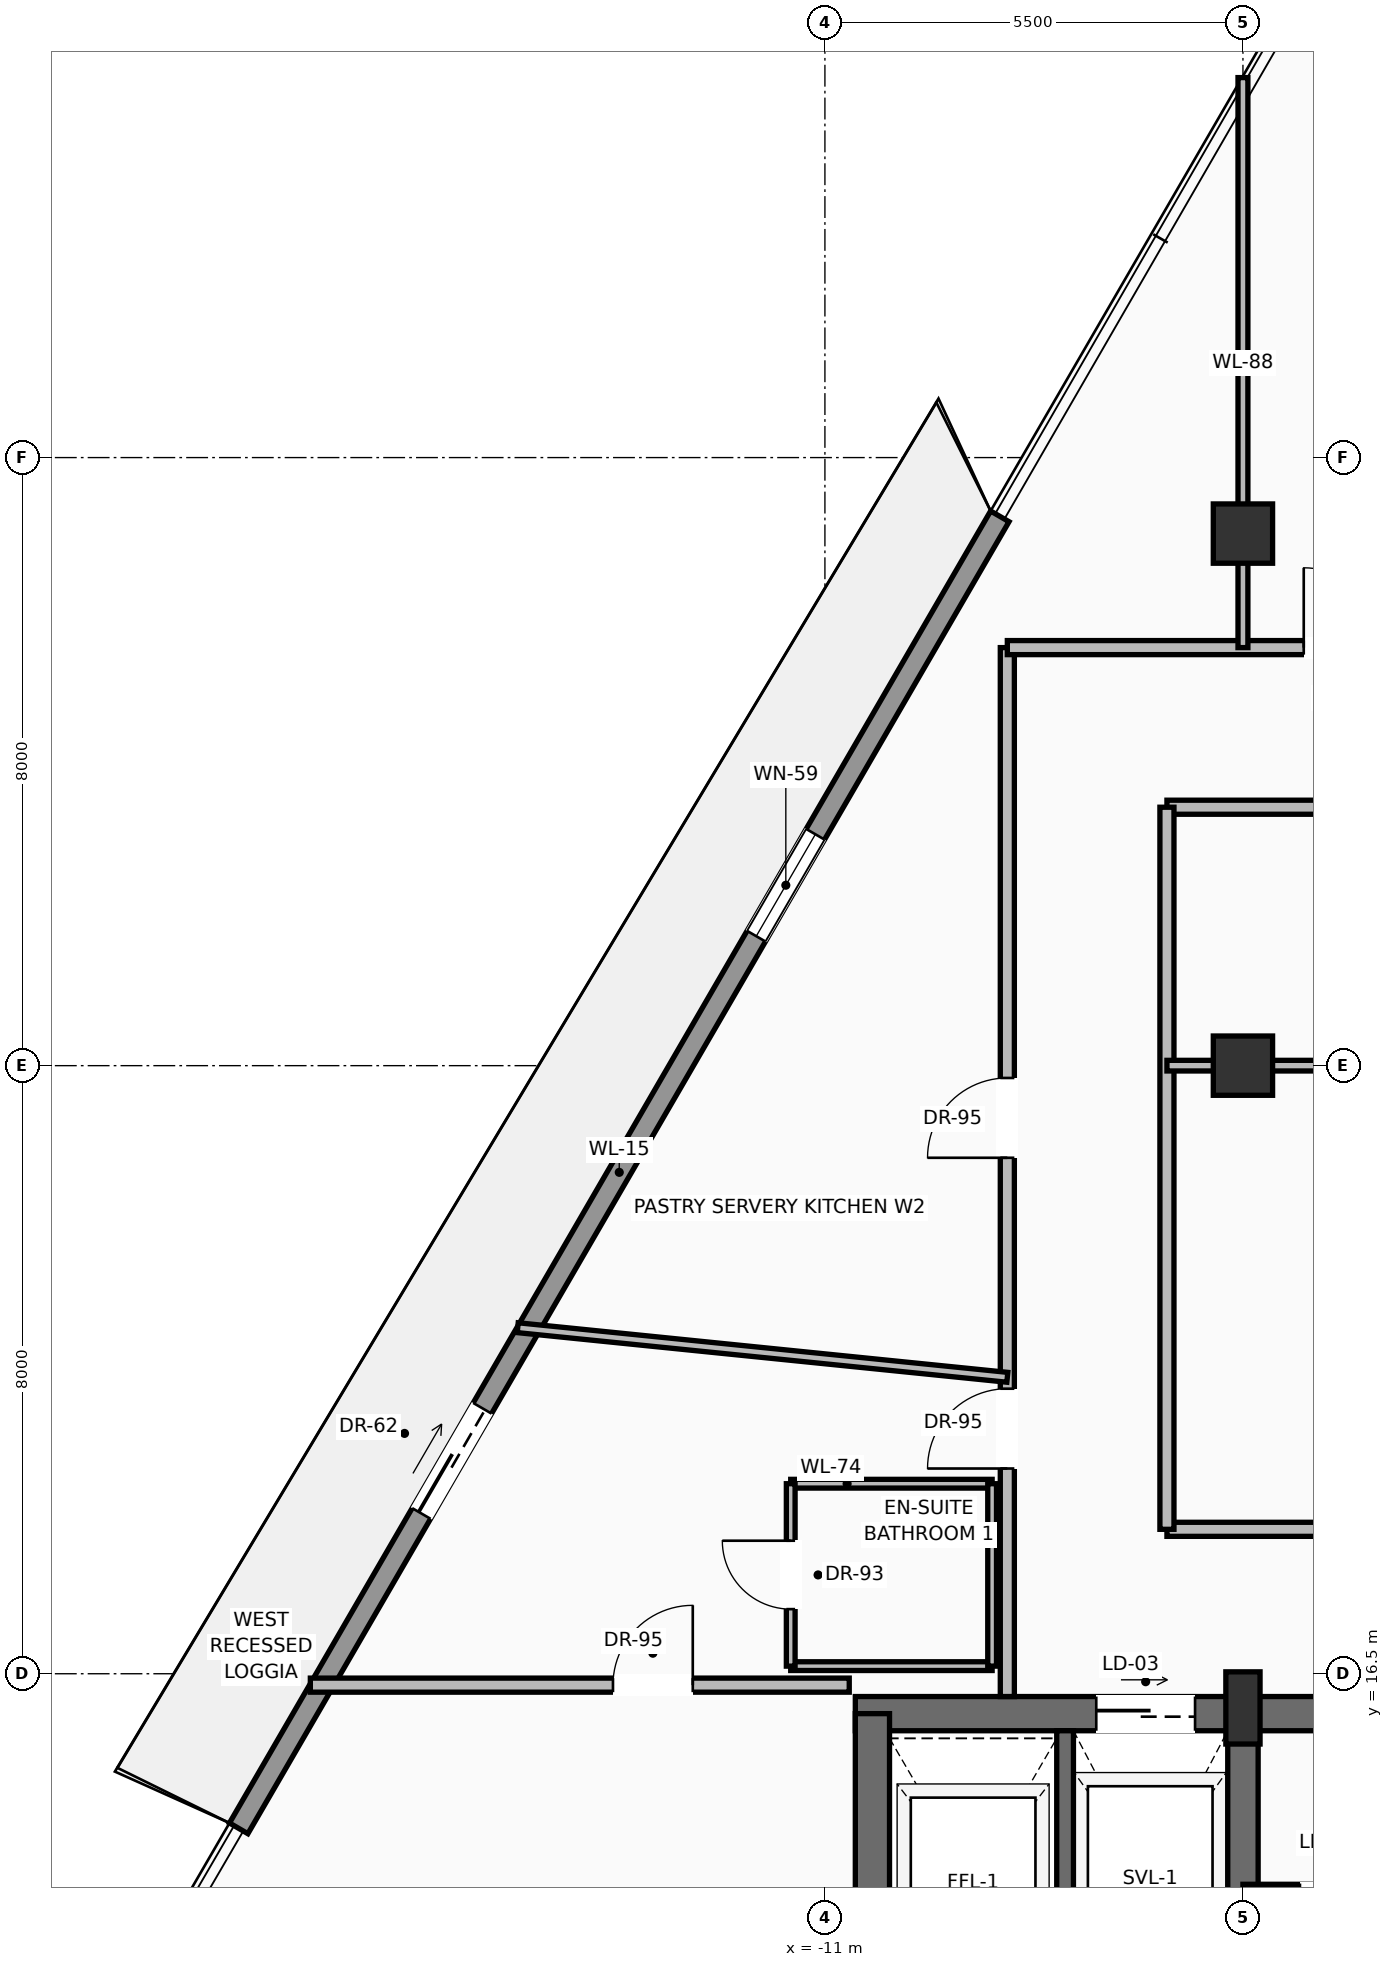
"""IFC4 building model, lengths in metres.
Left out: names, types, materials, properties, quantities, classifications, styles, units other than length and angle.
Written with IfcOpenShell. Run it as: python <this file> out.ifc"""

import sys

from ifc_helpers import new_model, si_unit, direction, frame, frame_2d, origin, origin_2d, place, context, subcontext, project, spatial, rectangle, extrude, source, transform, mapped, element, fill, save


model = new_model("IFC4")
c1 = context("Model", 3, precision=1e-05, world=origin(), true_north=direction((0.0, 1.0)))
c2 = subcontext(c1, "Body", "Model", "MODEL_VIEW")
j1 = project(units=[si_unit("LENGTHUNIT", "METRE"), si_unit("PLANEANGLEUNIT", "RADIAN")], contexts=[c1])
p1 = place(None, origin())
s1 = spatial("IfcSite", under=j1, at=p1, CompositionType="ELEMENT")
p2 = place(p1, origin())
s2 = spatial("IfcBuilding", under=s1, at=p2, CompositionType="ELEMENT")
p3 = place(p2, frame((0.0, 0.0, 266.1)))
s3 = spatial("IfcBuildingStorey", under=s2, at=p3, CompositionType="ELEMENT", Elevation=266.1)
p4 = place(p3, frame((-10.6, 15.975, 0.0), z_axis=(0.0, 0.0, 1.0), x_axis=(1.0, 0.0, 0.0)))
e1 = element("IfcWall", 1, at=p4, inside=s3, PredefinedType="SHEAR", context=c2, shape_type="SweptSolid", body=[
    extrude(rectangle(XDim=21.2, YDim=0.45, at=frame_2d((10.6, 0.0))), origin(), (0.0, 0.0, 1.0), 3.24),
])
p5 = place(p4, frame((3.17, 0.0, 0.0)))
e2 = element("IfcOpeningElement", 2, at=p5, cuts=e1, PredefinedType="OPENING", context=c2, shape_type="SweptSolid", body=[
    extrude(rectangle(XDim=1.3, YDim=2.3, at=frame_2d((0.65, 1.15))), frame((0.0, 0.235, 0.0), z_axis=(0.0, -1.0, 0.0), x_axis=(1.0, 0.0, 0.0)), (0.0, 0.0, 1.0), 0.47),
])
p6 = place(p4, frame((9.6, 0.0, 0.0)))
e3 = element("IfcOpeningElement", 3, at=p6, cuts=e1, PredefinedType="OPENING", context=c2, shape_type="SweptSolid", body=[
    extrude(rectangle(XDim=2.0, YDim=2.4, at=frame_2d((1.0, 1.2))), frame((0.0, 0.235, 0.0), z_axis=(0.0, -1.0, 0.0), x_axis=(1.0, 0.0, 0.0)), (0.0, 0.0, 1.0), 0.47),
])
p7 = place(p3, frame((-10.375, 0.625, 0.0), z_axis=(0.0, 0.0, 1.0), x_axis=(0.0, 1.0, 0.0)))
e4 = element("IfcWall", 4, at=p7, inside=s3, PredefinedType="SHEAR", context=c2, shape_type="SweptSolid", body=[
    extrude(rectangle(XDim=15.35, YDim=0.45, at=frame_2d((7.675, 0.0))), origin(), (0.0, 0.0, 1.0), 3.24),
])
p8 = place(p3, frame((-5.5, 0.625, 0.0), z_axis=(0.0, 0.0, 1.0), x_axis=(0.0, 1.0, 0.0)))
e5 = element("IfcWall", 5, at=p8, inside=s3, PredefinedType="SHEAR", context=c2, shape_type="SweptSolid", body=[
    extrude(rectangle(XDim=15.35, YDim=0.4, at=frame_2d((7.675, 0.0))), origin(), (0.0, 0.0, 1.0), 3.24),
])
p9 = place(p8, frame((8.875, 0.0, 0.0)))
e6 = element("IfcOpeningElement", 6, at=p9, cuts=e5, PredefinedType="OPENING", context=c2, shape_type="SweptSolid", body=[
    extrude(rectangle(XDim=1.1, YDim=2.2, at=frame_2d((0.55, 1.1))), frame((0.0, 0.21, 0.0), z_axis=(0.0, -1.0, 0.0), x_axis=(1.0, 0.0, 0.0)), (0.0, 0.0, 1.0), 0.42),
])
m1 = source(origin(), c2, "Body", "SweptSolid", [
    extrude(rectangle(XDim=0.45, YDim=0.95, at=origin_2d()), origin(), (0.0, 0.0, 1.0), 3.45),
])
p10 = place(p3, frame((-5.5, 16.05, 0.0), z_axis=(0.0, 0.0, 1.0), x_axis=(1.0, 0.0, 0.0)))
e7 = element("IfcColumn", 7, at=p10, inside=s3, PredefinedType="PILASTER", context=c2, shape_type="MappedRepresentation", body=[
    mapped(m1, transform((0.0, 0.0, 0.0), scale=1.0)),
])
m2 = source(origin(), c2, "Body", "SweptSolid", [
    extrude(rectangle(XDim=0.78, YDim=0.78, at=origin_2d()), origin(), (0.0, 0.0, 1.0), 3.45),
])
for number, where, z_axis, x_axis in (
    (8, (-5.5, 24.5, 0.0), (0.0, 0.0, 1.0), (1.0, 0.0, 0.0)),
    (9, (-5.5, 31.5, 0.0), (0.0, 0.0, 1.0), (1.0, 0.0, 0.0)),
):
    element("IfcColumn", number, at=place(p3, frame(where, z_axis=z_axis, x_axis=x_axis)), inside=s3, PredefinedType="COLUMN", context=c2, shape_type="MappedRepresentation", body=[
        mapped(m2, transform((0.0, 0.0, 0.0), scale=1.0)),
    ])
p11 = place(p3, frame((-18.713, 14.466, 0.0), z_axis=(0.0, 0.0, 1.0), x_axis=(0.501837095331, 0.864962155097, 0.0)))
e10 = element("IfcWall", 10, at=p11, inside=s3, PredefinedType="SOLIDWALL", context=c2, shape_type="SweptSolid", body=[
    extrude(rectangle(XDim=19.956, YDim=0.28, at=frame_2d((9.978, 0.0))), origin(), (0.0, 0.0, 1.0), 2.82),
])
p12 = place(p11, frame((4.789, 0.0, 0.0)))
e11 = element("IfcOpeningElement", 11, at=p12, cuts=e10, PredefinedType="OPENING", context=c2, shape_type="SweptSolid", body=[
    extrude(rectangle(XDim=1.6, YDim=2.35, at=frame_2d((0.8, 1.175))), frame((0.0, 0.15, 0.0), z_axis=(0.0, -1.0, 0.0), x_axis=(1.0, 0.0, 0.0)), (0.0, 0.0, 1.0), 0.3),
])
p13 = place(p11, frame((13.57, 0.0, 0.9)))
e12 = element("IfcOpeningElement", 12, at=p13, cuts=e10, PredefinedType="OPENING", context=c2, shape_type="SweptSolid", body=[
    extrude(rectangle(XDim=1.55, YDim=1.75, at=frame_2d((0.775, 0.875))), frame((0.0, 0.15, 0.0), z_axis=(0.0, -1.0, 0.0), x_axis=(1.0, 0.0, 0.0)), (0.0, 0.0, 1.0), 0.3),
])
p14 = place(p3, frame((-7.84, 11.87, 0.0), z_axis=(0.0, 0.0, 1.0), x_axis=(0.0, 1.0, 0.0)))
e13 = element("IfcWall", 13, at=p14, inside=s3, PredefinedType="SOLIDWALL", context=c2, shape_type="SweptSolid", body=[
    extrude(rectangle(XDim=3.88, YDim=0.22, at=frame_2d((1.94, 0.0))), origin(), (0.0, 0.0, 1.0), 3.24),
])
p15 = place(p3, frame((-5.5, 13.62, 0.0), z_axis=(0.0, 0.0, 1.0), x_axis=(1.0, 0.0, 0.0)))
e14 = element("IfcWall", 14, at=p15, inside=s3, PredefinedType="SOLIDWALL", context=c2, shape_type="SweptSolid", body=[
    extrude(rectangle(XDim=7.32, YDim=0.22, at=frame_2d((3.66, 0.0))), origin(), (0.0, 0.0, 1.0), 3.24),
])
p16 = place(p15, frame((0.75, 0.0, 0.0)))
e15 = element("IfcOpeningElement", 15, at=p16, cuts=e14, PredefinedType="OPENING", context=c2, shape_type="SweptSolid", body=[
    extrude(rectangle(XDim=1.1, YDim=2.2, at=frame_2d((0.55, 1.1))), frame((0.0, 0.12, 0.0), z_axis=(0.0, -1.0, 0.0), x_axis=(1.0, 0.0, 0.0)), (0.0, 0.0, 1.0), 0.24),
])
p17 = place(p15, frame((3.15, 0.0, 0.0)))
e16 = element("IfcOpeningElement", 16, at=p17, cuts=e14, PredefinedType="OPENING", context=c2, shape_type="SweptSolid", body=[
    extrude(rectangle(XDim=1.1, YDim=2.2, at=frame_2d((0.55, 1.1))), frame((0.0, 0.12, 0.0), z_axis=(0.0, -1.0, 0.0), x_axis=(1.0, 0.0, 0.0)), (0.0, 0.0, 1.0), 0.24),
])
p18 = place(p15, frame((5.55, 0.0, 0.0)))
e17 = element("IfcOpeningElement", 17, at=p18, cuts=e14, PredefinedType="OPENING", context=c2, shape_type="SweptSolid", body=[
    extrude(rectangle(XDim=1.1, YDim=2.2, at=frame_2d((0.55, 1.1))), frame((0.0, 0.12, 0.0), z_axis=(0.0, -1.0, 0.0), x_axis=(1.0, 0.0, 0.0)), (0.0, 0.0, 1.0), 0.24),
])
p19 = place(p3, frame((-6.5, 18.4, 0.0), z_axis=(0.0, 0.0, 1.0), x_axis=(1.0, 0.0, 0.0)))
e18 = element("IfcWall", 18, at=p19, inside=s3, PredefinedType="PARTITIONING", context=c2, shape_type="SweptSolid", body=[
    extrude(rectangle(XDim=12.45, YDim=0.185, at=frame_2d((6.225, 0.0))), origin(), (0.0, 0.0, 1.0), 3.232),
])
p20 = place(p19, frame((5.75, 0.0, 0.0)))
e19 = element("IfcOpeningElement", 19, at=p20, cuts=e18, PredefinedType="OPENING", context=c2, shape_type="SweptSolid", body=[
    extrude(rectangle(XDim=0.95, YDim=2.2, at=frame_2d((0.475, 1.1))), frame((0.0, 0.103, 0.0), z_axis=(0.0, -1.0, 0.0), x_axis=(1.0, 0.0, 0.0)), (0.0, 0.0, 1.0), 0.205),
])
p21 = place(p3, frame((-6.5, 27.9, 0.0), z_axis=(0.0, 0.0, 1.0), x_axis=(1.0, 0.0, 0.0)))
e20 = element("IfcWall", 20, at=p21, inside=s3, PredefinedType="PARTITIONING", context=c2, shape_type="SweptSolid", body=[
    extrude(rectangle(XDim=12.45, YDim=0.185, at=frame_2d((6.225, 0.0))), origin(), (0.0, 0.0, 1.0), 2.885),
])
p22 = place(p21, frame((5.75, 0.0, 0.0)))
e21 = element("IfcOpeningElement", 21, at=p22, cuts=e20, PredefinedType="OPENING", context=c2, shape_type="SweptSolid", body=[
    extrude(rectangle(XDim=0.95, YDim=2.2, at=frame_2d((0.475, 1.1))), frame((0.0, 0.103, 0.0), z_axis=(0.0, -1.0, 0.0), x_axis=(1.0, 0.0, 0.0)), (0.0, 0.0, 1.0), 0.205),
])
p23 = place(p3, frame((-6.5, 18.4, 0.0), z_axis=(0.0, 0.0, 1.0), x_axis=(0.0, 1.0, 0.0)))
e22 = element("IfcWall", 22, at=p23, inside=s3, PredefinedType="PARTITIONING", context=c2, shape_type="SweptSolid", body=[
    extrude(rectangle(XDim=9.5, YDim=0.185, at=frame_2d((4.75, 0.0))), origin(), (0.0, 0.0, 1.0), 3.232),
])
p24 = place(p3, frame((-8.6, 16.2, 0.0), z_axis=(0.0, 0.0, 1.0), x_axis=(0.0, 1.0, 0.0)))
e23 = element("IfcWall", 23, at=p24, inside=s3, PredefinedType="PARTITIONING", context=c2, shape_type="SweptSolid", body=[
    extrude(rectangle(XDim=13.8, YDim=0.185, at=frame_2d((6.9, 0.0))), origin(), (0.0, 0.0, 1.0), 3.232),
])
p25 = place(p24, frame((3.0, 0.0, 0.0)))
e24 = element("IfcOpeningElement", 24, at=p25, cuts=e23, PredefinedType="OPENING", context=c2, shape_type="SweptSolid", body=[
    extrude(rectangle(XDim=1.05, YDim=2.25, at=frame_2d((0.525, 1.125))), frame((0.0, 0.103, 0.0), z_axis=(0.0, -1.0, 0.0), x_axis=(1.0, 0.0, 0.0)), (0.0, 0.0, 1.0), 0.205),
])
p26 = place(p24, frame((7.088, 0.0, 0.0)))
e25 = element("IfcOpeningElement", 25, at=p26, cuts=e23, PredefinedType="OPENING", context=c2, shape_type="SweptSolid", body=[
    extrude(rectangle(XDim=1.05, YDim=2.25, at=frame_2d((0.525, 1.125))), frame((0.0, 0.103, 0.0), z_axis=(0.0, -1.0, 0.0), x_axis=(1.0, 0.0, 0.0)), (0.0, 0.0, 1.0), 0.205),
])
p27 = place(p3, frame((-8.6, 30.0, 0.0), z_axis=(0.0, 0.0, 1.0), x_axis=(1.0, 0.0, 0.0)))
e26 = element("IfcWall", 26, at=p27, inside=s3, PredefinedType="PARTITIONING", context=c2, shape_type="SweptSolid", body=[
    extrude(rectangle(XDim=16.65, YDim=0.185, at=frame_2d((8.325, 0.0))), origin(), (0.0, 0.0, 1.0), 3.232),
])
p28 = place(p27, frame((3.9, 0.0, 0.0)))
e27 = element("IfcOpeningElement", 27, at=p28, cuts=e26, PredefinedType="OPENING", context=c2, shape_type="SweptSolid", body=[
    extrude(rectangle(XDim=1.05, YDim=2.25, at=frame_2d((0.525, 1.125))), frame((0.0, 0.103, 0.0), z_axis=(0.0, -1.0, 0.0), x_axis=(1.0, 0.0, 0.0)), (0.0, 0.0, 1.0), 0.205),
])
p29 = place(p27, frame((7.8, 0.0, 0.0)))
e28 = element("IfcOpeningElement", 28, at=p29, cuts=e26, PredefinedType="OPENING", context=c2, shape_type="SweptSolid", body=[
    extrude(rectangle(XDim=1.05, YDim=2.25, at=frame_2d((0.525, 1.125))), frame((0.0, 0.103, 0.0), z_axis=(0.0, -1.0, 0.0), x_axis=(1.0, 0.0, 0.0)), (0.0, 0.0, 1.0), 0.205),
])
p30 = place(p27, frame((12.25, 0.0, 0.0)))
e29 = element("IfcOpeningElement", 29, at=p30, cuts=e26, PredefinedType="OPENING", context=c2, shape_type="SweptSolid", body=[
    extrude(rectangle(XDim=1.05, YDim=2.25, at=frame_2d((0.525, 1.125))), frame((0.0, 0.103, 0.0), z_axis=(0.0, -1.0, 0.0), x_axis=(1.0, 0.0, 0.0)), (0.0, 0.0, 1.0), 0.205),
])
p31 = place(p3, frame((-6.5, 24.5, 0.0), z_axis=(0.0, 0.0, 1.0), x_axis=(1.0, 0.0, 0.0)))
e30 = element("IfcWall", 30, at=p31, inside=s3, PredefinedType="PARTITIONING", context=c2, shape_type="SweptSolid", body=[
    extrude(rectangle(XDim=12.45, YDim=0.14, at=frame_2d((6.225, 0.0))), origin(), (0.0, 0.0, 1.0), 2.683),
])
p32 = place(p3, frame((-17.77, 16.35, 0.0), z_axis=(0.0, 0.0, 1.0), x_axis=(1.0, 0.0, 0.0)))
e31 = element("IfcWall", 31, at=p32, inside=s3, PredefinedType="PARTITIONING", context=c2, shape_type="SweptSolid", body=[
    extrude(rectangle(XDim=7.09, YDim=0.185, at=frame_2d((3.545, 0.0))), origin(), (0.0, 0.0, 1.0), 3.232),
])
p33 = place(p32, frame((3.982, 0.0, 0.0)))
e32 = element("IfcOpeningElement", 32, at=p33, cuts=e31, PredefinedType="OPENING", context=c2, shape_type="SweptSolid", body=[
    extrude(rectangle(XDim=1.05, YDim=2.25, at=frame_2d((0.525, 1.125))), frame((0.0, 0.103, 0.0), z_axis=(0.0, -1.0, 0.0), x_axis=(1.0, 0.0, 0.0)), (0.0, 0.0, 1.0), 0.205),
])
p34 = place(p3, frame((-5.5, 30.0, 0.0), z_axis=(0.0, 0.0, 1.0), x_axis=(0.0, 1.0, 0.0)))
e33 = element("IfcWall", 33, at=p34, inside=s3, PredefinedType="PARTITIONING", context=c2, shape_type="SweptSolid", body=[
    extrude(rectangle(XDim=7.499, YDim=0.13, at=frame_2d((3.75, 0.0))), origin(), (0.0, 0.0, 1.0), 2.683),
])
for number, where, z_axis, x_axis in (
    (34, (-11.45, 16.6, 0.0), (0.0, 0.0, 1.0), (1.0, 0.0, 0.0)),
    (35, (-11.45, 19.0, 0.0), (0.0, 0.0, 1.0), (1.0, 0.0, 0.0)),
):
    element("IfcWall", number, at=place(p3, frame(where, z_axis=z_axis, x_axis=x_axis)), inside=s3, PredefinedType="PARTITIONING", context=c2, shape_type="SweptSolid", body=[
        extrude(rectangle(XDim=2.65, YDim=0.115, at=frame_2d((1.325, 0.0))), origin(), (0.0, 0.0, 1.0), 3.232),
    ])
p35 = place(p3, frame((-11.45, 16.6, 0.0), z_axis=(0.0, 0.0, 1.0), x_axis=(0.0, 1.0, 0.0)))
e36 = element("IfcWall", 36, at=p35, inside=s3, PredefinedType="PARTITIONING", context=c2, shape_type="SweptSolid", body=[
    extrude(rectangle(XDim=2.4, YDim=0.115, at=frame_2d((1.2, 0.0))), origin(), (0.0, 0.0, 1.0), 3.232),
])
p36 = place(p35, frame((0.75, 0.0, 0.0)))
e37 = element("IfcOpeningElement", 37, at=p36, cuts=e36, PredefinedType="OPENING", context=c2, shape_type="SweptSolid", body=[
    extrude(rectangle(XDim=0.9, YDim=2.15, at=frame_2d((0.45, 1.075))), frame((0.0, 0.067, 0.0), z_axis=(0.0, -1.0, 0.0), x_axis=(1.0, 0.0, 0.0)), (0.0, 0.0, 1.0), 0.135),
])
p37 = place(p3, frame((-8.8, 16.6, 0.0), z_axis=(0.0, 0.0, 1.0), x_axis=(0.0, 1.0, 0.0)))
e38 = element("IfcWall", 38, at=p37, inside=s3, PredefinedType="PARTITIONING", context=c2, shape_type="SweptSolid", body=[
    extrude(rectangle(XDim=2.4, YDim=0.115, at=frame_2d((1.2, 0.0))), origin(), (0.0, 0.0, 1.0), 3.232),
])
p38 = place(p3, frame((-15.042, 21.052, 0.0), z_axis=(0.0, 0.0, 1.0), x_axis=(0.994907937397, -0.100787876778, 0.0)))
e39 = element("IfcWall", 39, at=p38, inside=s3, PredefinedType="PARTITIONING", context=c2, shape_type="SweptSolid", body=[
    extrude(rectangle(XDim=6.475, YDim=0.13, at=frame_2d((3.237, 0.0))), origin(), (0.0, 0.0, 1.0), 3.232),
])
m3 = source(origin(), c2, "Body", "SweptSolid", [
    extrude(rectangle(XDim=1.6, YDim=2.35, at=frame_2d((0.8, 1.175))), frame((0.0, 0.025, 0.0), z_axis=(0.0, -1.0, 0.0), x_axis=(1.0, 0.0, 0.0)), (0.0, 0.0, 1.0), 0.05),
])
p39 = place(p12, origin())
e40 = element("IfcDoor", 40, at=p39, inside=s3, OperationType="SLIDING_TO_LEFT", PredefinedType="DOOR", context=c2, shape_type="MappedRepresentation", body=[
    mapped(m3, transform((0.0, 0.0, 0.0), scale=1.0)),
])
fill(e11, e40)
m4 = source(origin(), c2, "Body", "SweptSolid", [
    extrude(rectangle(XDim=1.55, YDim=1.75, at=frame_2d((0.775, 0.875))), frame((0.0, 0.03, 0.0), z_axis=(0.0, -1.0, 0.0), x_axis=(1.0, 0.0, 0.0)), (0.0, 0.0, 1.0), 0.06),
])
p40 = place(p13, origin())
e41 = element("IfcWindow", 41, at=p40, inside=s3, PartitioningType="SINGLE_PANEL", PredefinedType="WINDOW", context=c2, shape_type="MappedRepresentation", body=[
    mapped(m4, transform((0.0, 0.0, 0.0), scale=1.0)),
])
fill(e12, e41)
m5 = source(origin(), c2, "Body", "SweptSolid", [
    extrude(rectangle(XDim=1.3, YDim=2.3, at=frame_2d((0.65, 1.15))), frame((0.0, 0.025, 0.0), z_axis=(0.0, -1.0, 0.0), x_axis=(1.0, 0.0, 0.0)), (0.0, 0.0, 1.0), 0.05),
])
p41 = place(p5, origin())
e42 = element("IfcDoor", 42, at=p41, inside=s3, OperationType="SLIDING_TO_RIGHT", PredefinedType="DOOR", context=c2, shape_type="MappedRepresentation", body=[
    mapped(m5, transform((0.0, 0.0, 0.0), scale=1.0)),
])
fill(e2, e42)
m6 = source(origin(), c2, "Body", "SweptSolid", [
    extrude(rectangle(XDim=1.05, YDim=2.25, at=frame_2d((0.525, 1.125))), frame((0.0, 0.025, 0.0), z_axis=(0.0, -1.0, 0.0), x_axis=(1.0, 0.0, 0.0)), (0.0, 0.0, 1.0), 0.05),
])
p42 = place(p33, origin())
e43 = element("IfcDoor", 43, at=p42, inside=s3, OperationType="SINGLE_SWING_RIGHT", PredefinedType="DOOR", context=c2, shape_type="MappedRepresentation", body=[
    mapped(m6, transform((0.0, 0.0, 0.0), scale=1.0)),
])
fill(e32, e43)
p43 = place(p25, origin())
e44 = element("IfcDoor", 44, at=p43, inside=s3, OperationType="SINGLE_SWING_LEFT", PredefinedType="DOOR", context=c2, shape_type="MappedRepresentation", body=[
    mapped(m6, transform((0.0, 0.0, 0.0), scale=1.0)),
])
fill(e24, e44)
m7 = source(origin(), c2, "Body", "SweptSolid", [
    extrude(rectangle(XDim=0.9, YDim=2.15, at=frame_2d((0.45, 1.075))), frame((0.0, 0.025, 0.0), z_axis=(0.0, -1.0, 0.0), x_axis=(1.0, 0.0, 0.0)), (0.0, 0.0, 1.0), 0.05),
])
p44 = place(p36, origin())
e45 = element("IfcDoor", 45, at=p44, inside=s3, OperationType="SINGLE_SWING_RIGHT", PredefinedType="DOOR", context=c2, shape_type="MappedRepresentation", body=[
    mapped(m7, transform((0.0, 0.0, 0.0), scale=1.0)),
])
fill(e37, e45)
p45 = place(p26, origin())
e46 = element("IfcDoor", 46, at=p45, inside=s3, OperationType="SINGLE_SWING_LEFT", PredefinedType="DOOR", context=c2, shape_type="MappedRepresentation", body=[
    mapped(m6, transform((0.0, 0.0, 0.0), scale=1.0)),
])
fill(e25, e46)
p46 = place(p28, origin())
e47 = element("IfcDoor", 47, at=p46, inside=s3, OperationType="SINGLE_SWING_LEFT", PredefinedType="DOOR", context=c2, shape_type="MappedRepresentation", body=[
    mapped(m6, transform((0.0, 0.0, 0.0), scale=1.0)),
])
fill(e27, e47)
save(model, sys.argv[1])
